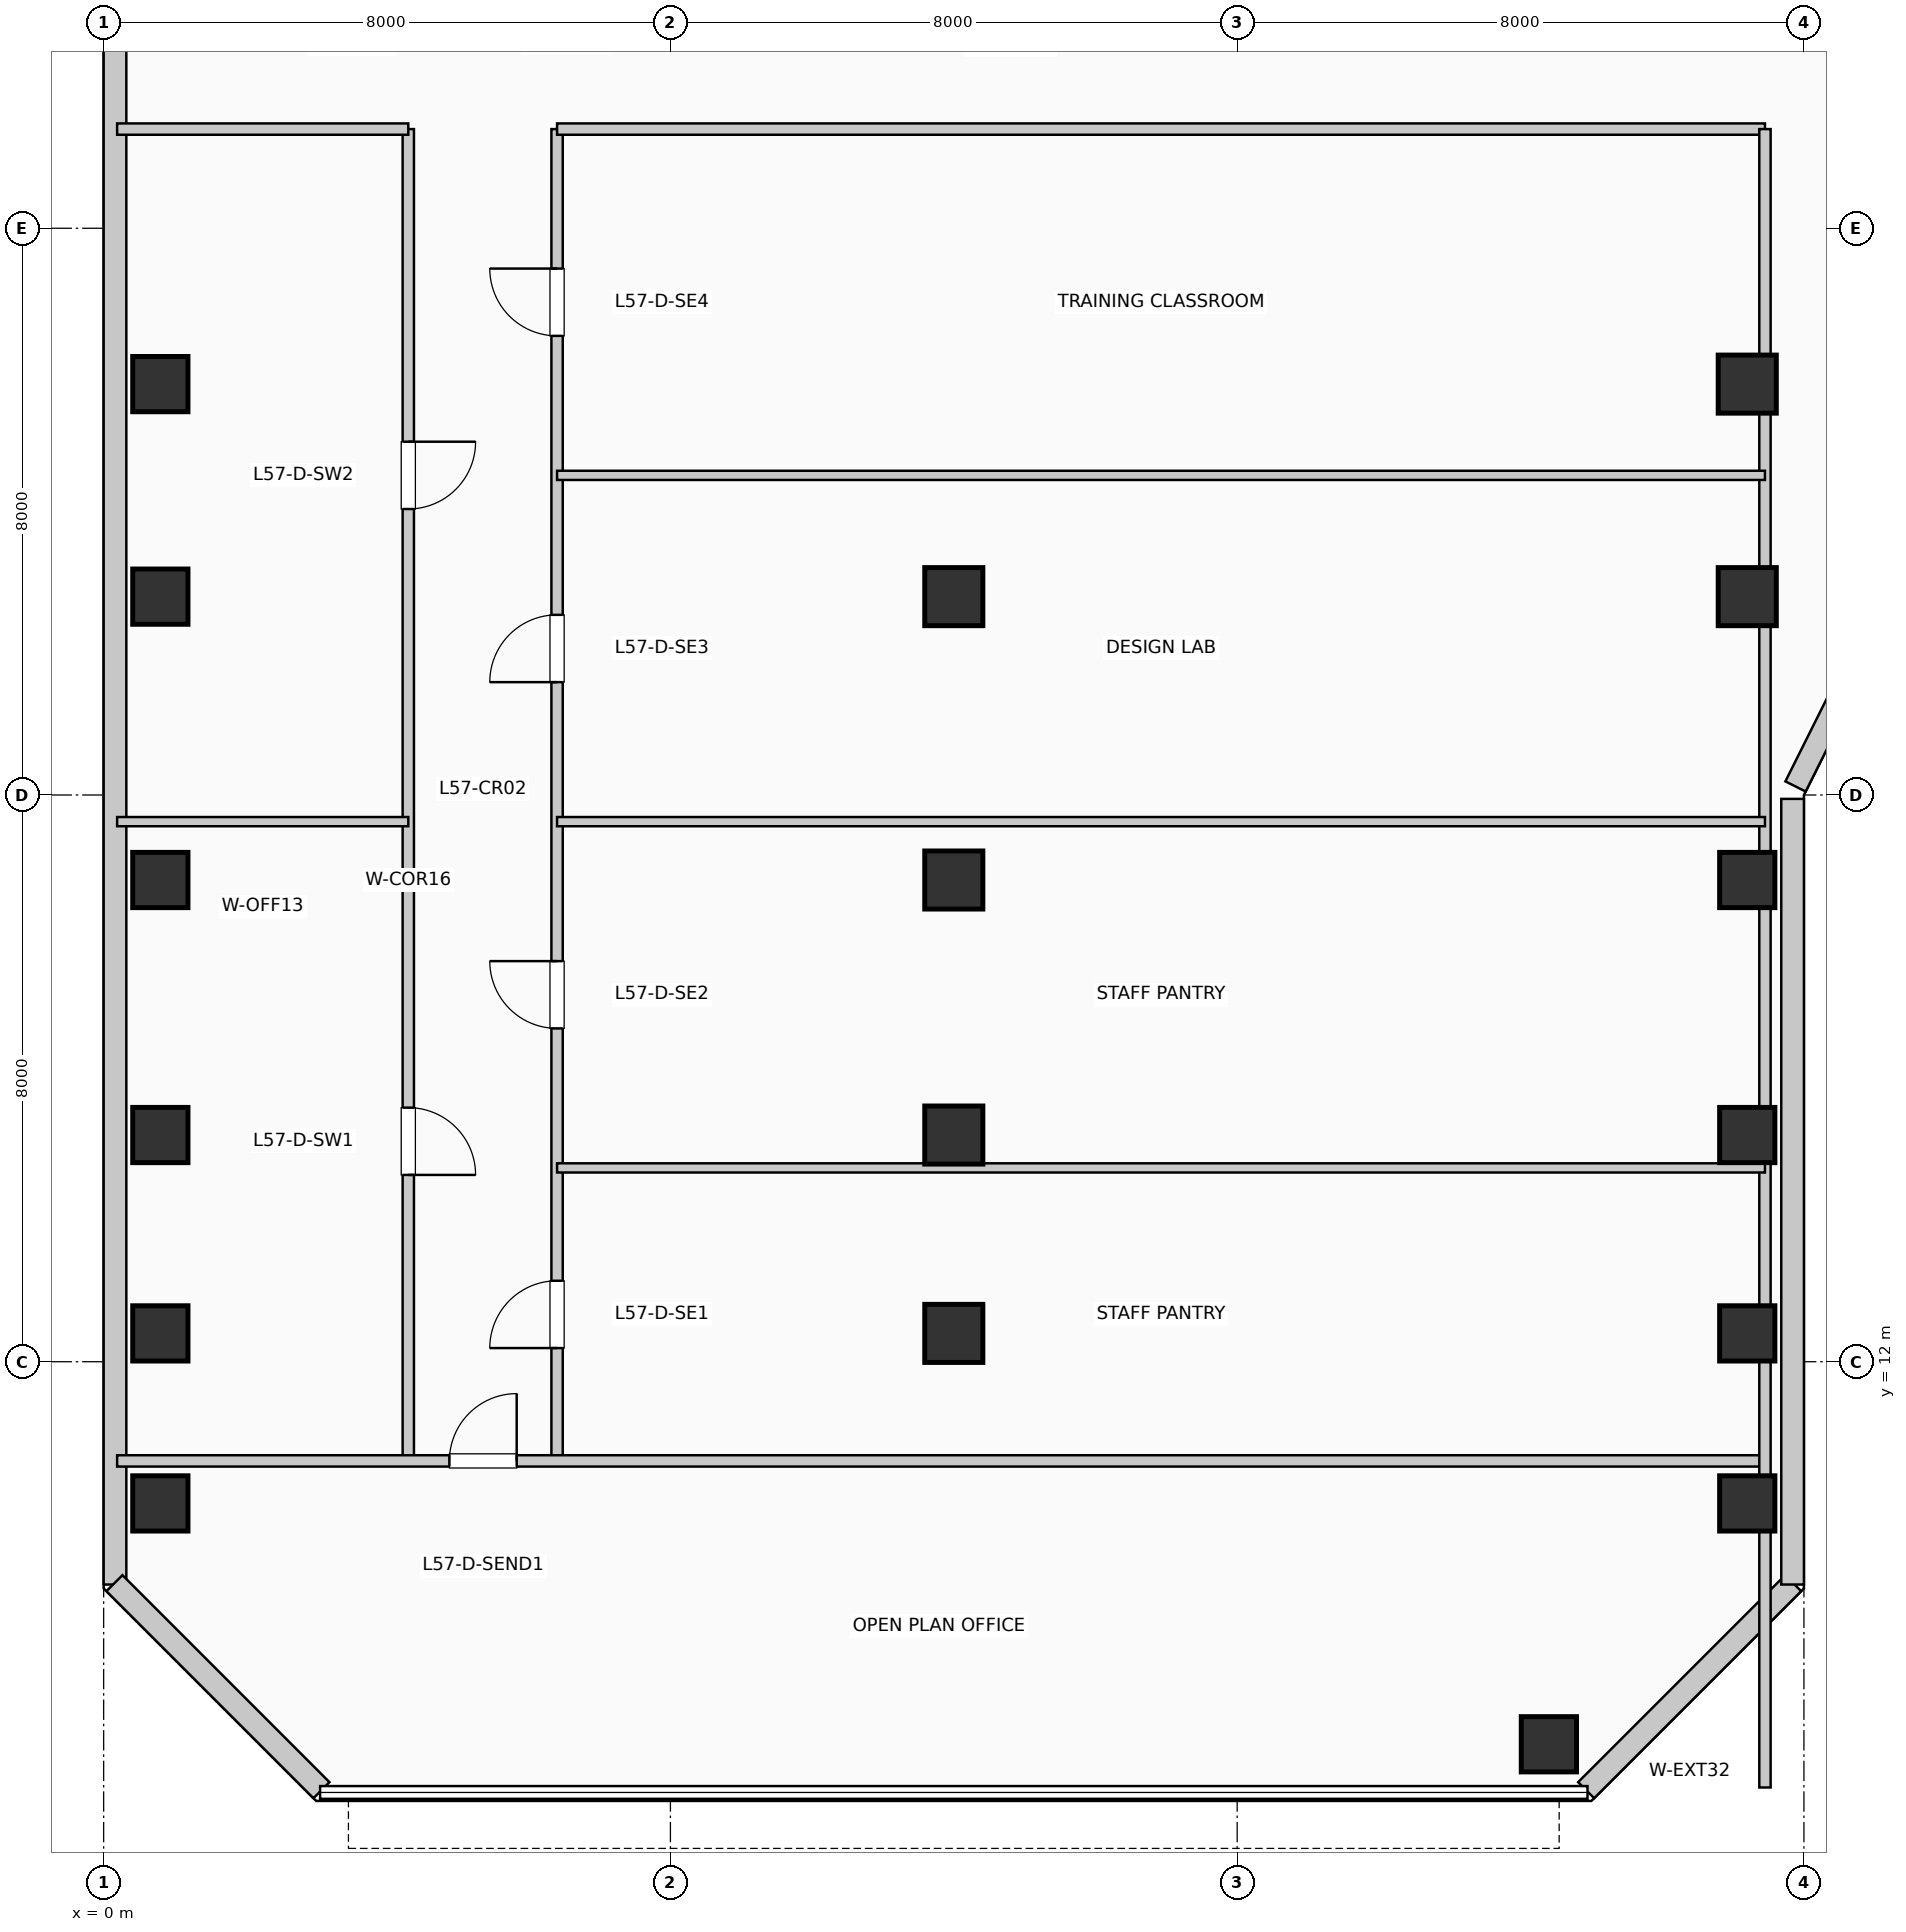
"""IFC4 building model, lengths in metres.
Left out: names, types, materials, properties, quantities, classifications, styles, units other than length and angle.
Written with IfcOpenShell. Run it as: python <this file> out.ifc"""

import sys

from ifc_helpers import new_model, si_unit, direction, frame, frame_2d, origin, origin_2d, place, context, subcontext, project, spatial, rectangle, extrude, element, fill, save


model = new_model("IFC4")
c1 = context("Model", 3, precision=1e-05, world=origin(), true_north=direction((0.0, 1.0)))
c2 = subcontext(c1, "Body", "Model", "MODEL_VIEW")
j1 = project(units=[si_unit("LENGTHUNIT", "METRE"), si_unit("PLANEANGLEUNIT", "RADIAN")], contexts=[c1])
p1 = place(None, origin())
s1 = spatial("IfcSite", under=j1, at=p1, CompositionType="ELEMENT")
p2 = place(p1, origin())
s2 = spatial("IfcBuilding", under=s1, at=p2, CompositionType="ELEMENT")
p3 = place(p2, frame((0.0, 0.0, 235.62)))
s3 = spatial("IfcBuildingStorey", under=s2, at=p3, CompositionType="ELEMENT", Elevation=235.62)
for number, where, z_axis, x_axis in (
    (1, (0.8, 10.0, 0.0), (0.0, 0.0, 1.0), (1.0, 0.0, 0.0)),
    (2, (0.8, 12.4, 0.0), (0.0, 0.0, 1.0), (1.0, 0.0, 0.0)),
    (3, (0.8, 15.2, 0.0), (0.0, 0.0, 1.0), (1.0, 0.0, 0.0)),
    (4, (0.8, 18.8, 0.0), (0.0, 0.0, 1.0), (1.0, 0.0, 0.0)),
    (5, (0.8, 22.8, 0.0), (0.0, 0.0, 1.0), (1.0, 0.0, 0.0)),
    (6, (0.8, 25.8, 0.0), (0.0, 0.0, 1.0), (1.0, 0.0, 0.0)),
):
    element("IfcColumn", number, at=place(p3, frame(where, z_axis=z_axis, x_axis=x_axis)), inside=s3, PredefinedType="COLUMN", context=c2, shape_type="SweptSolid", body=[
        extrude(rectangle(XDim=0.78, YDim=0.78, at=origin_2d()), origin(), (0.0, 0.0, 1.0), 3.96),
    ])
for number, where, z_axis, x_axis in (
    (7, (12.0, 12.4, 0.0), (0.0, 0.0, 1.0), (1.0, 0.0, 0.0)),
    (8, (12.0, 15.2, 0.0), (0.0, 0.0, 1.0), (1.0, 0.0, 0.0)),
    (9, (12.0, 18.8, 0.0), (0.0, 0.0, 1.0), (1.0, 0.0, 0.0)),
    (10, (12.0, 22.8, 0.0), (0.0, 0.0, 1.0), (1.0, 0.0, 0.0)),
):
    element("IfcColumn", number, at=place(p3, frame(where, z_axis=z_axis, x_axis=x_axis)), inside=s3, PredefinedType="COLUMN", context=c2, shape_type="SweptSolid", body=[
        extrude(rectangle(XDim=0.82, YDim=0.82, at=origin_2d()), origin(), (0.0, 0.0, 1.0), 3.96),
    ])
for number, where, z_axis, x_axis in (
    (11, (20.4, 6.6, 0.0), (0.0, 0.0, 1.0), (1.0, 0.0, 0.0)),
    (12, (23.2, 10.0, 0.0), (0.0, 0.0, 1.0), (1.0, 0.0, 0.0)),
    (13, (23.2, 12.4, 0.0), (0.0, 0.0, 1.0), (1.0, 0.0, 0.0)),
    (14, (23.2, 15.2, 0.0), (0.0, 0.0, 1.0), (1.0, 0.0, 0.0)),
    (15, (23.2, 18.8, 0.0), (0.0, 0.0, 1.0), (1.0, 0.0, 0.0)),
):
    element("IfcColumn", number, at=place(p3, frame(where, z_axis=z_axis, x_axis=x_axis)), inside=s3, PredefinedType="COLUMN", context=c2, shape_type="SweptSolid", body=[
        extrude(rectangle(XDim=0.78, YDim=0.78, at=origin_2d()), origin(), (0.0, 0.0, 1.0), 3.96),
    ])
for number, where, z_axis, x_axis in (
    (16, (23.2, 22.8, 0.0), (0.0, 0.0, 1.0), (1.0, 0.0, 0.0)),
    (17, (23.2, 25.8, 0.0), (0.0, 0.0, 1.0), (1.0, 0.0, 0.0)),
):
    element("IfcColumn", number, at=place(p3, frame(where, z_axis=z_axis, x_axis=x_axis)), inside=s3, PredefinedType="COLUMN", context=c2, shape_type="SweptSolid", body=[
        extrude(rectangle(XDim=0.82, YDim=0.82, at=origin_2d()), origin(), (0.0, 0.0, 1.0), 3.96),
    ])
p4 = place(p3, frame((20.926, 5.952, 0.0), z_axis=(0.0, 0.0, 1.0), x_axis=(0.707077242712, 0.707136318428, 0.0)))
e18 = element("IfcWall", 18, at=p4, inside=s3, PredefinedType="SOLIDWALL", context=c2, shape_type="SweptSolid", body=[
    extrude(rectangle(XDim=4.133, YDim=0.32, at=frame_2d((2.066, 0.0))), origin(), (0.0, 0.0, 1.0), 3.71),
])
p5 = place(p3, frame((23.84, 8.855, 0.0), z_axis=(0.0, 0.0, 1.0), x_axis=(0.0, 1.0, 0.0)))
e19 = element("IfcWall", 19, at=p5, inside=s3, PredefinedType="SOLIDWALL", context=c2, shape_type="SweptSolid", body=[
    extrude(rectangle(XDim=11.09, YDim=0.32, at=frame_2d((5.545, 0.0))), origin(), (0.0, 0.0, 1.0), 3.71),
])
p6 = place(p3, frame((23.882, 20.121, 0.0), z_axis=(0.0, 0.0, 1.0), x_axis=(0.447121734542, 0.894473115583, 0.0)))
e20 = element("IfcWall", 20, at=p6, inside=s3, PredefinedType="SOLIDWALL", context=c2, shape_type="SweptSolid", body=[
    extrude(rectangle(XDim=2.126, YDim=0.32, at=frame_2d((1.063, 0.0))), origin(), (0.0, 0.0, 1.0), 3.71),
])
p7 = place(p3, frame((0.16, 34.395, 0.0), z_axis=(0.0, 0.0, 1.0), x_axis=(0.0, -1.0, 0.0)))
e21 = element("IfcWall", 21, at=p7, inside=s3, PredefinedType="SOLIDWALL", context=c2, shape_type="SweptSolid", body=[
    extrude(rectangle(XDim=25.54, YDim=0.32, at=frame_2d((12.77, 0.0))), origin(), (0.0, 0.0, 1.0), 3.71),
])
p8 = place(p3, frame((0.152, 8.874, 0.0), z_axis=(0.0, 0.0, 1.0), x_axis=(0.707077242712, -0.707136318428, 0.0)))
e22 = element("IfcWall", 22, at=p8, inside=s3, PredefinedType="SOLIDWALL", context=c2, shape_type="SweptSolid", body=[
    extrude(rectangle(XDim=4.133, YDim=0.32, at=frame_2d((2.066, 0.0))), origin(), (0.0, 0.0, 1.0), 3.71),
])
p9 = place(p3, frame((4.3, 10.6, 0.0), z_axis=(0.0, 0.0, 1.0), x_axis=(0.0, 1.0, 0.0)))
e23 = element("IfcWall", 23, at=p9, inside=s3, PredefinedType="PARTITIONING", context=c2, shape_type="SweptSolid", body=[
    extrude(rectangle(XDim=18.8, YDim=0.16, at=frame_2d((9.4, 0.0))), origin(), (0.0, 0.0, 1.0), 3.71),
])
p10 = place(p9, frame((4.987, 0.0, 0.0), z_axis=(0.0, 0.0, 1.0), x_axis=(-1.0, 0.0, 0.0)))
e24 = element("IfcOpeningElement", 24, at=p10, cuts=e23, PredefinedType="OPENING", context=c2, shape_type="SweptSolid", body=[
    extrude(rectangle(XDim=0.95, YDim=2.15, at=frame_2d((0.475, 1.075))), frame((0.0, 0.09, 0.0), z_axis=(0.0, -1.0, 0.0), x_axis=(1.0, 0.0, 0.0)), (0.0, 0.0, 1.0), 0.18),
])
p11 = place(p9, frame((14.387, 0.0, 0.0), z_axis=(0.0, 0.0, 1.0), x_axis=(-1.0, 0.0, 0.0)))
e25 = element("IfcOpeningElement", 25, at=p11, cuts=e23, PredefinedType="OPENING", context=c2, shape_type="SweptSolid", body=[
    extrude(rectangle(XDim=0.95, YDim=2.15, at=frame_2d((0.475, 1.075))), frame((0.0, 0.09, 0.0), z_axis=(0.0, -1.0, 0.0), x_axis=(1.0, 0.0, 0.0)), (0.0, 0.0, 1.0), 0.18),
])
p12 = place(p3, frame((6.4, 10.6, 0.0), z_axis=(0.0, 0.0, 1.0), x_axis=(0.0, 1.0, 0.0)))
e26 = element("IfcWall", 26, at=p12, inside=s3, PredefinedType="PARTITIONING", context=c2, shape_type="SweptSolid", body=[
    extrude(rectangle(XDim=18.8, YDim=0.16, at=frame_2d((9.4, 0.0))), origin(), (0.0, 0.0, 1.0), 3.71),
])
p13 = place(p12, frame((1.593, 0.0, 0.0)))
e27 = element("IfcOpeningElement", 27, at=p13, cuts=e26, PredefinedType="OPENING", context=c2, shape_type="SweptSolid", body=[
    extrude(rectangle(XDim=0.95, YDim=2.15, at=frame_2d((0.475, 1.075))), frame((0.0, 0.09, 0.0), z_axis=(0.0, -1.0, 0.0), x_axis=(1.0, 0.0, 0.0)), (0.0, 0.0, 1.0), 0.18),
])
p14 = place(p12, frame((6.105, 0.0, 0.0)))
e28 = element("IfcOpeningElement", 28, at=p14, cuts=e26, PredefinedType="OPENING", context=c2, shape_type="SweptSolid", body=[
    extrude(rectangle(XDim=0.95, YDim=2.15, at=frame_2d((0.475, 1.075))), frame((0.0, 0.09, 0.0), z_axis=(0.0, -1.0, 0.0), x_axis=(1.0, 0.0, 0.0)), (0.0, 0.0, 1.0), 0.18),
])
p15 = place(p12, frame((10.993, 0.0, 0.0)))
e29 = element("IfcOpeningElement", 29, at=p15, cuts=e26, PredefinedType="OPENING", context=c2, shape_type="SweptSolid", body=[
    extrude(rectangle(XDim=0.95, YDim=2.15, at=frame_2d((0.475, 1.075))), frame((0.0, 0.09, 0.0), z_axis=(0.0, -1.0, 0.0), x_axis=(1.0, 0.0, 0.0)), (0.0, 0.0, 1.0), 0.18),
])
p16 = place(p12, frame((15.881, 0.0, 0.0)))
e30 = element("IfcOpeningElement", 30, at=p16, cuts=e26, PredefinedType="OPENING", context=c2, shape_type="SweptSolid", body=[
    extrude(rectangle(XDim=0.95, YDim=2.15, at=frame_2d((0.475, 1.075))), frame((0.0, 0.09, 0.0), z_axis=(0.0, -1.0, 0.0), x_axis=(1.0, 0.0, 0.0)), (0.0, 0.0, 1.0), 0.18),
])
p17 = place(p3, frame((0.19, 10.6, 0.0), z_axis=(0.0, 0.0, 1.0), x_axis=(1.0, 0.0, 0.0)))
e31 = element("IfcWall", 31, at=p17, inside=s3, PredefinedType="PARTITIONING", context=c2, shape_type="SweptSolid", body=[
    extrude(rectangle(XDim=23.26, YDim=0.16, at=frame_2d((11.63, 0.0))), origin(), (0.0, 0.0, 1.0), 3.71),
])
p18 = place(p17, frame((4.69, 0.0, 0.0)))
e32 = element("IfcOpeningElement", 32, at=p18, cuts=e31, PredefinedType="OPENING", context=c2, shape_type="SweptSolid", body=[
    extrude(rectangle(XDim=0.95, YDim=2.15, at=frame_2d((0.475, 1.075))), frame((0.0, 0.09, 0.0), z_axis=(0.0, -1.0, 0.0), x_axis=(1.0, 0.0, 0.0)), (0.0, 0.0, 1.0), 0.18),
])
p19 = place(p3, frame((0.19, 29.4, 0.0), z_axis=(0.0, 0.0, 1.0), x_axis=(1.0, 0.0, 0.0)))
e33 = element("IfcWall", 33, at=p19, inside=s3, PredefinedType="PARTITIONING", context=c2, shape_type="SweptSolid", body=[
    extrude(rectangle(XDim=4.11, YDim=0.16, at=frame_2d((2.055, 0.0))), origin(), (0.0, 0.0, 1.0), 3.365),
])
p20 = place(p3, frame((6.4, 29.4, 0.0), z_axis=(0.0, 0.0, 1.0), x_axis=(1.0, 0.0, 0.0)))
e34 = element("IfcWall", 34, at=p20, inside=s3, PredefinedType="PARTITIONING", context=c2, shape_type="SweptSolid", body=[
    extrude(rectangle(XDim=17.05, YDim=0.16, at=frame_2d((8.525, 0.0))), origin(), (0.0, 0.0, 1.0), 3.365),
])
p21 = place(p3, frame((23.45, 5.99, 0.0), z_axis=(0.0, 0.0, 1.0), x_axis=(0.0, 1.0, 0.0)))
e35 = element("IfcWall", 35, at=p21, inside=s3, PredefinedType="PARTITIONING", context=c2, shape_type="SweptSolid", body=[
    extrude(rectangle(XDim=23.41, YDim=0.16, at=frame_2d((11.705, 0.0))), origin(), (0.0, 0.0, 1.0), 3.095),
])
p22 = place(p3, frame((0.19, 19.624, 0.0), z_axis=(0.0, 0.0, 1.0), x_axis=(1.0, 0.0, 0.0)))
e36 = element("IfcWall", 36, at=p22, inside=s3, PredefinedType="PARTITIONING", context=c2, shape_type="SweptSolid", body=[
    extrude(rectangle(XDim=4.11, YDim=0.13, at=frame_2d((2.055, 0.0))), origin(), (0.0, 0.0, 1.0), 3.71),
])
p23 = place(p3, frame((6.4, 14.736, 0.0), z_axis=(0.0, 0.0, 1.0), x_axis=(1.0, 0.0, 0.0)))
e37 = element("IfcWall", 37, at=p23, inside=s3, PredefinedType="PARTITIONING", context=c2, shape_type="SweptSolid", body=[
    extrude(rectangle(XDim=17.05, YDim=0.13, at=frame_2d((8.525, 0.0))), origin(), (0.0, 0.0, 1.0), 3.095),
])
for number, where, z_axis, x_axis in (
    (38, (6.4, 19.624, 0.0), (0.0, 0.0, 1.0), (1.0, 0.0, 0.0)),
    (39, (6.4, 24.512, 0.0), (0.0, 0.0, 1.0), (1.0, 0.0, 0.0)),
):
    element("IfcWall", number, at=place(p3, frame(where, z_axis=z_axis, x_axis=x_axis)), inside=s3, PredefinedType="PARTITIONING", context=c2, shape_type="SweptSolid", body=[
        extrude(rectangle(XDim=17.05, YDim=0.13, at=frame_2d((8.525, 0.0))), origin(), (0.0, 0.0, 1.0), 3.71),
    ])
p24 = place(p18, origin())
e40 = element("IfcDoor", 40, at=p24, inside=s3, OperationType="SINGLE_SWING_RIGHT", PredefinedType="DOOR", context=c2, shape_type="SweptSolid", body=[
    extrude(rectangle(XDim=0.95, YDim=2.15, at=frame_2d((0.475, 1.075))), frame((0.0, 0.025, 0.0), z_axis=(0.0, -1.0, 0.0), x_axis=(1.0, 0.0, 0.0)), (0.0, 0.0, 1.0), 0.05),
])
fill(e32, e40)
p25 = place(p10, origin())
e41 = element("IfcDoor", 41, at=p25, inside=s3, OperationType="SINGLE_SWING_LEFT", PredefinedType="DOOR", context=c2, shape_type="SweptSolid", body=[
    extrude(rectangle(XDim=0.95, YDim=2.15, at=frame_2d((0.475, 1.075))), frame((0.0, 0.025, 0.0), z_axis=(0.0, -1.0, 0.0), x_axis=(1.0, 0.0, 0.0)), (0.0, 0.0, 1.0), 0.05),
])
fill(e24, e41)
p26 = place(p11, origin())
e42 = element("IfcDoor", 42, at=p26, inside=s3, OperationType="SINGLE_SWING_RIGHT", PredefinedType="DOOR", context=c2, shape_type="SweptSolid", body=[
    extrude(rectangle(XDim=0.95, YDim=2.15, at=frame_2d((0.475, 1.075))), frame((0.0, 0.025, 0.0), z_axis=(0.0, -1.0, 0.0), x_axis=(1.0, 0.0, 0.0)), (0.0, 0.0, 1.0), 0.05),
])
fill(e25, e42)
p27 = place(p13, origin())
e43 = element("IfcDoor", 43, at=p27, inside=s3, OperationType="SINGLE_SWING_LEFT", PredefinedType="DOOR", context=c2, shape_type="SweptSolid", body=[
    extrude(rectangle(XDim=0.95, YDim=2.15, at=frame_2d((0.475, 1.075))), frame((0.0, 0.025, 0.0), z_axis=(0.0, -1.0, 0.0), x_axis=(1.0, 0.0, 0.0)), (0.0, 0.0, 1.0), 0.05),
])
fill(e27, e43)
p28 = place(p14, origin())
e44 = element("IfcDoor", 44, at=p28, inside=s3, OperationType="SINGLE_SWING_RIGHT", PredefinedType="DOOR", context=c2, shape_type="SweptSolid", body=[
    extrude(rectangle(XDim=0.95, YDim=2.15, at=frame_2d((0.475, 1.075))), frame((0.0, 0.025, 0.0), z_axis=(0.0, -1.0, 0.0), x_axis=(1.0, 0.0, 0.0)), (0.0, 0.0, 1.0), 0.05),
])
fill(e28, e44)
p29 = place(p15, origin())
e45 = element("IfcDoor", 45, at=p29, inside=s3, OperationType="SINGLE_SWING_LEFT", PredefinedType="DOOR", context=c2, shape_type="SweptSolid", body=[
    extrude(rectangle(XDim=0.95, YDim=2.15, at=frame_2d((0.475, 1.075))), frame((0.0, 0.025, 0.0), z_axis=(0.0, -1.0, 0.0), x_axis=(1.0, 0.0, 0.0)), (0.0, 0.0, 1.0), 0.05),
])
fill(e29, e45)
p30 = place(p16, origin())
e46 = element("IfcDoor", 46, at=p30, inside=s3, OperationType="SINGLE_SWING_RIGHT", PredefinedType="DOOR", context=c2, shape_type="SweptSolid", body=[
    extrude(rectangle(XDim=0.95, YDim=2.15, at=frame_2d((0.475, 1.075))), frame((0.0, 0.025, 0.0), z_axis=(0.0, -1.0, 0.0), x_axis=(1.0, 0.0, 0.0)), (0.0, 0.0, 1.0), 0.05),
])
fill(e30, e46)
save(model, sys.argv[1])
